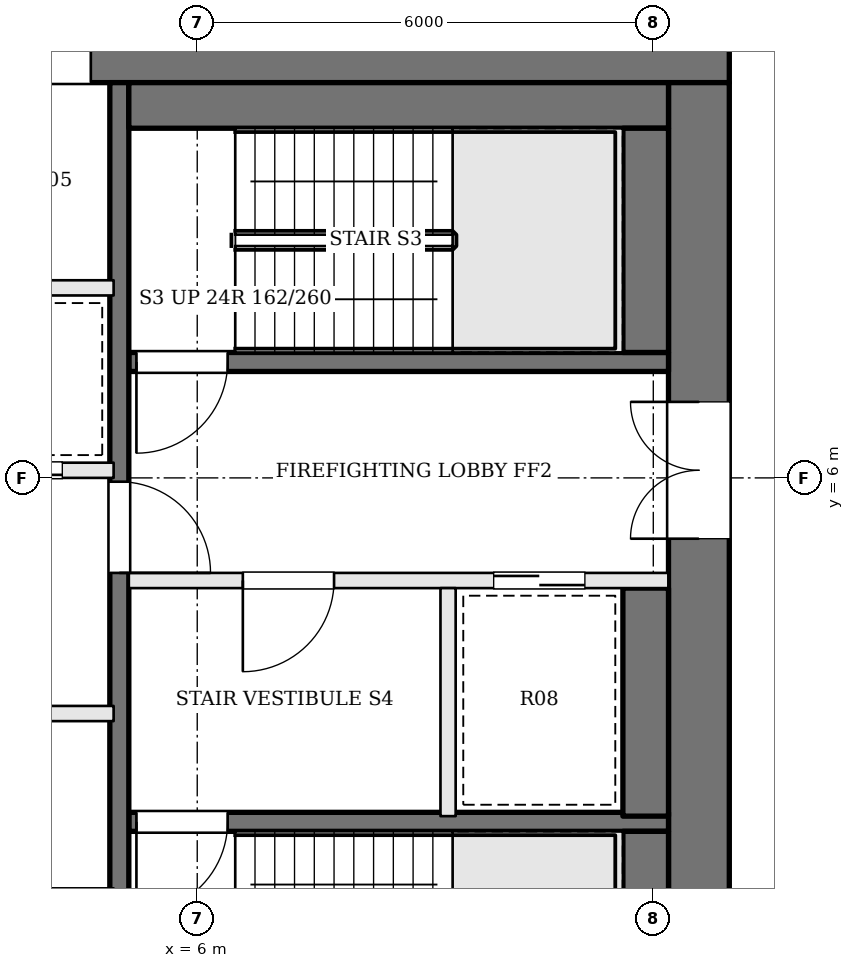
"""IFC4 building model, lengths in metres.
Left out: names, types, materials, properties, quantities, classifications, styles, units other than length and angle.
Written with IfcOpenShell. Run it as: python <this file> out.ifc"""

import sys

from ifc_helpers import new_model, si_unit, direction, frame, frame_2d, origin, place, context, subcontext, project, spatial, rectangle, extrude, element, fill, save


model = new_model("IFC4")
c1 = context("Model", 3, precision=1e-05, world=origin(), true_north=direction((0.0, 1.0)))
c2 = subcontext(c1, "Body", "Model", "MODEL_VIEW")
j1 = project(units=[si_unit("LENGTHUNIT", "METRE"), si_unit("PLANEANGLEUNIT", "RADIAN")], contexts=[c1])
p1 = place(None, origin())
s1 = spatial("IfcSite", under=j1, at=p1, CompositionType="ELEMENT")
p2 = place(p1, origin())
s2 = spatial("IfcBuilding", under=s1, at=p2, CompositionType="ELEMENT")
p3 = place(p2, frame((0.0, 0.0, 221.4)))
s3 = spatial("IfcBuildingStorey", under=s2, at=p3, CompositionType="ELEMENT", Elevation=221.4)
p4 = place(p3, frame((-13.0, 11.6, 0.0), z_axis=(0.0, 0.0, 1.0), x_axis=(1.0, 0.0, 0.0)))
e1 = element("IfcWall", 1, at=p4, inside=s3, PredefinedType="SHEAR", context=c2, shape_type="SweptSolid", body=[
    extrude(rectangle(XDim=26.0, YDim=0.8, at=frame_2d((13.0, 0.0))), origin(), (0.0, 0.0, 1.0), 3.9),
])
p5 = place(p4, frame((9.65, 0.0, 0.0)))
e2 = element("IfcOpeningElement", 2, at=p5, cuts=e1, PredefinedType="OPENING", context=c2, shape_type="SweptSolid", body=[
    extrude(rectangle(XDim=1.0, YDim=2.1, at=frame_2d((0.5, 1.05))), frame((0.0, 0.41, 0.0), z_axis=(0.0, -1.0, 0.0), x_axis=(1.0, 0.0, 0.0)), (0.0, 0.0, 1.0), 0.82),
])
p6 = place(p4, frame((12.675, 0.0, 0.0)))
e3 = element("IfcOpeningElement", 3, at=p6, cuts=e1, PredefinedType="OPENING", context=c2, shape_type="SweptSolid", body=[
    extrude(rectangle(XDim=0.7, YDim=2.1, at=frame_2d((0.35, 1.05))), frame((0.0, 0.41, 0.0), z_axis=(0.0, -1.0, 0.0), x_axis=(1.0, 0.0, 0.0)), (0.0, 0.0, 1.0), 0.82),
])
p7 = place(p4, frame((14.725, 0.0, 0.0)))
e4 = element("IfcOpeningElement", 4, at=p7, cuts=e1, PredefinedType="OPENING", context=c2, shape_type="SweptSolid", body=[
    extrude(rectangle(XDim=0.7, YDim=2.1, at=frame_2d((0.35, 1.05))), frame((0.0, 0.41, 0.0), z_axis=(0.0, -1.0, 0.0), x_axis=(1.0, 0.0, 0.0)), (0.0, 0.0, 1.0), 0.82),
])
p8 = place(p4, frame((16.6, 0.0, 0.0)))
e5 = element("IfcOpeningElement", 5, at=p8, cuts=e1, PredefinedType="OPENING", context=c2, shape_type="SweptSolid", body=[
    extrude(rectangle(XDim=1.0, YDim=2.1, at=frame_2d((0.5, 1.05))), frame((0.0, 0.41, 0.0), z_axis=(0.0, -1.0, 0.0), x_axis=(1.0, 0.0, 0.0)), (0.0, 0.0, 1.0), 0.82),
])
p9 = place(p3, frame((12.6, -2.2, 0.0), z_axis=(0.0, 0.0, 1.0), x_axis=(0.0, 1.0, 0.0)))
e6 = element("IfcWall", 6, at=p9, inside=s3, PredefinedType="SHEAR", context=c2, shape_type="SweptSolid", body=[
    extrude(rectangle(XDim=13.4, YDim=0.8, at=frame_2d((6.7, 0.0))), origin(), (0.0, 0.0, 1.0), 3.9),
])
p10 = place(p9, frame((7.4, 0.0, 0.0)))
e7 = element("IfcOpeningElement", 7, at=p10, cuts=e6, PredefinedType="OPENING", context=c2, shape_type="SweptSolid", body=[
    extrude(rectangle(XDim=1.8, YDim=2.1, at=frame_2d((0.9, 1.05))), frame((0.0, 0.41, 0.0), z_axis=(0.0, -1.0, 0.0), x_axis=(1.0, 0.0, 0.0)), (0.0, 0.0, 1.0), 0.82),
])
p11 = place(p3, frame((12.2, 7.525, 0.0), z_axis=(0.0, 0.0, 1.0), x_axis=(-1.0, 0.0, 0.0)))
e8 = element("IfcWall", 8, at=p11, inside=s3, PredefinedType="SOLIDWALL", context=c2, shape_type="SweptSolid", body=[
    extrude(rectangle(XDim=7.1, YDim=0.25, at=frame_2d((3.55, 0.0))), origin(), (0.0, 0.0, 1.0), 3.7),
])
p12 = place(p11, frame((5.8, 0.0, 0.0)))
e9 = element("IfcOpeningElement", 9, at=p12, cuts=e8, PredefinedType="OPENING", context=c2, shape_type="SweptSolid", body=[
    extrude(rectangle(XDim=1.2, YDim=2.1, at=frame_2d((0.6, 1.05))), frame((0.0, 0.135, 0.0), z_axis=(0.0, -1.0, 0.0), x_axis=(1.0, 0.0, 0.0)), (0.0, 0.0, 1.0), 0.27),
])
p13 = place(p3, frame((12.2, 4.65, 0.0), z_axis=(0.0, 0.0, 1.0), x_axis=(-1.0, 0.0, 0.0)))
e10 = element("IfcWall", 10, at=p13, inside=s3, PredefinedType="SOLIDWALL", context=c2, shape_type="SweptSolid", body=[
    extrude(rectangle(XDim=7.1, YDim=0.2, at=frame_2d((3.55, 0.0))), origin(), (0.0, 0.0, 1.0), 3.7),
])
p14 = place(p13, frame((4.4, 0.0, 0.0)))
e11 = element("IfcOpeningElement", 11, at=p14, cuts=e10, PredefinedType="OPENING", context=c2, shape_type="SweptSolid", body=[
    extrude(rectangle(XDim=1.2, YDim=2.1, at=frame_2d((0.6, 1.05))), frame((0.0, 0.11, 0.0), z_axis=(0.0, -1.0, 0.0), x_axis=(1.0, 0.0, 0.0)), (0.0, 0.0, 1.0), 0.22),
])
p15 = place(p13, frame((1.1, 0.0, 0.0)))
e12 = element("IfcOpeningElement", 12, at=p15, cuts=e10, PredefinedType="OPENING", context=c2, shape_type="SweptSolid", body=[
    extrude(rectangle(XDim=1.2, YDim=2.1, at=frame_2d((0.6, 1.05))), frame((0.0, 0.11, 0.0), z_axis=(0.0, -1.0, 0.0), x_axis=(1.0, 0.0, 0.0)), (0.0, 0.0, 1.0), 0.22),
])
p16 = place(p3, frame((12.2, 1.475, 0.0), z_axis=(0.0, 0.0, 1.0), x_axis=(-1.0, 0.0, 0.0)))
e13 = element("IfcWall", 13, at=p16, inside=s3, PredefinedType="SOLIDWALL", context=c2, shape_type="SweptSolid", body=[
    extrude(rectangle(XDim=7.1, YDim=0.25, at=frame_2d((3.55, 0.0))), origin(), (0.0, 0.0, 1.0), 3.7),
])
p17 = place(p16, frame((5.8, 0.0, 0.0)))
e14 = element("IfcOpeningElement", 14, at=p17, cuts=e13, PredefinedType="OPENING", context=c2, shape_type="SweptSolid", body=[
    extrude(rectangle(XDim=1.2, YDim=2.1, at=frame_2d((0.6, 1.05))), frame((0.0, 0.135, 0.0), z_axis=(0.0, -1.0, 0.0), x_axis=(1.0, 0.0, 0.0)), (0.0, 0.0, 1.0), 0.27),
])
p18 = place(p3, frame((9.3, 4.55, 0.0), z_axis=(0.0, 0.0, 1.0), x_axis=(0.0, -1.0, 0.0)))
e15 = element("IfcWall", 15, at=p18, inside=s3, PredefinedType="SOLIDWALL", context=c2, shape_type="SweptSolid", body=[
    extrude(rectangle(XDim=3.0, YDim=0.2, at=frame_2d((1.5, 0.0))), origin(), (0.0, 0.0, 1.0), 3.7),
])
p19 = place(p3, frame((4.975, 11.2, 0.0), z_axis=(0.0, 0.0, 1.0), x_axis=(0.0, -1.0, 0.0)))
e16 = element("IfcWall", 16, at=p19, inside=s3, PredefinedType="SOLIDWALL", context=c2, shape_type="SweptSolid", body=[
    extrude(rectangle(XDim=13.4, YDim=0.25, at=frame_2d((6.7, 0.0))), origin(), (0.0, 0.0, 1.0), 3.7),
])
p20 = place(p19, frame((5.25, 0.0, 0.0)))
e17 = element("IfcOpeningElement", 17, at=p20, cuts=e16, PredefinedType="OPENING", context=c2, shape_type="SweptSolid", body=[
    extrude(rectangle(XDim=1.2, YDim=2.1, at=frame_2d((0.6, 1.05))), frame((0.0, 0.135, 0.0), z_axis=(0.0, -1.0, 0.0), x_axis=(1.0, 0.0, 0.0)), (0.0, 0.0, 1.0), 0.27),
])
p21 = place(p3, frame((12.2, 10.9, 0.0), z_axis=(0.0, 0.0, 1.0), x_axis=(-1.0, 0.0, 0.0)))
e18 = element("IfcWall", 18, at=p21, inside=s3, PredefinedType="SOLIDWALL", context=c2, shape_type="SweptSolid", body=[
    extrude(rectangle(XDim=7.1, YDim=0.6, at=frame_2d((3.55, 0.0))), origin(), (0.0, 0.0, 1.0), 3.7),
])
p22 = place(p3, frame((11.9, 10.6, 0.0), z_axis=(0.0, 0.0, 1.0), x_axis=(0.0, -1.0, 0.0)))
e19 = element("IfcWall", 19, at=p22, inside=s3, PredefinedType="SOLIDWALL", context=c2, shape_type="SweptSolid", body=[
    extrude(rectangle(XDim=2.95, YDim=0.6, at=frame_2d((1.475, 0.0))), origin(), (0.0, 0.0, 1.0), 3.7),
])
p23 = place(p3, frame((11.9, 4.55, 0.0), z_axis=(0.0, 0.0, 1.0), x_axis=(0.0, -1.0, 0.0)))
e20 = element("IfcWall", 20, at=p23, inside=s3, PredefinedType="SOLIDWALL", context=c2, shape_type="SweptSolid", body=[
    extrude(rectangle(XDim=3.0, YDim=0.6, at=frame_2d((1.5, 0.0))), origin(), (0.0, 0.0, 1.0), 3.7),
])
p24 = place(p3, frame((11.9, 1.35, 0.0), z_axis=(0.0, 0.0, 1.0), x_axis=(0.0, -1.0, 0.0)))
e21 = element("IfcWall", 21, at=p24, inside=s3, PredefinedType="SOLIDWALL", context=c2, shape_type="SweptSolid", body=[
    extrude(rectangle(XDim=2.95, YDim=0.6, at=frame_2d((1.475, 0.0))), origin(), (0.0, 0.0, 1.0), 3.7),
])
p25 = place(p3, frame((-4.9, 2.9, 0.0), z_axis=(0.0, 0.0, 1.0), x_axis=(1.0, 0.0, 0.0)))
e22 = element("IfcWall", 22, at=p25, inside=s3, PredefinedType="SOLIDWALL", context=c2, shape_type="SweptSolid", body=[
    extrude(rectangle(XDim=9.8, YDim=0.2, at=frame_2d((4.9, 0.0))), origin(), (0.0, 0.0, 1.0), 3.7),
])
p26 = place(p25, frame((0.675, 0.0, 0.0)))
e23 = element("IfcOpeningElement", 23, at=p26, cuts=e22, PredefinedType="OPENING", context=c2, shape_type="SweptSolid", body=[
    extrude(rectangle(XDim=1.1, YDim=2.1, at=frame_2d((0.55, 1.05))), frame((0.0, 0.11, 0.0), z_axis=(0.0, -1.0, 0.0), x_axis=(1.0, 0.0, 0.0)), (0.0, 0.0, 1.0), 0.22),
])
p27 = place(p25, frame((2.613, 0.0, 0.0)))
e24 = element("IfcOpeningElement", 24, at=p27, cuts=e22, PredefinedType="OPENING", context=c2, shape_type="SweptSolid", body=[
    extrude(rectangle(XDim=0.9, YDim=2.1, at=frame_2d((0.45, 1.05))), frame((0.0, 0.11, 0.0), z_axis=(0.0, -1.0, 0.0), x_axis=(1.0, 0.0, 0.0)), (0.0, 0.0, 1.0), 0.22),
])
p28 = place(p25, frame((4.35, 0.0, 0.0)))
e25 = element("IfcOpeningElement", 25, at=p28, cuts=e22, PredefinedType="OPENING", context=c2, shape_type="SweptSolid", body=[
    extrude(rectangle(XDim=1.1, YDim=2.1, at=frame_2d((0.55, 1.05))), frame((0.0, 0.11, 0.0), z_axis=(0.0, -1.0, 0.0), x_axis=(1.0, 0.0, 0.0)), (0.0, 0.0, 1.0), 0.22),
])
p29 = place(p25, frame((7.463, 0.0, 0.0)))
e26 = element("IfcOpeningElement", 26, at=p29, cuts=e22, PredefinedType="OPENING", context=c2, shape_type="SweptSolid", body=[
    extrude(rectangle(XDim=1.0, YDim=2.1, at=frame_2d((0.5, 1.05))), frame((0.0, 0.11, 0.0), z_axis=(0.0, -1.0, 0.0), x_axis=(1.0, 0.0, 0.0)), (0.0, 0.0, 1.0), 0.22),
])
p30 = place(p3, frame((-4.9, 6.1, 0.0), z_axis=(0.0, 0.0, 1.0), x_axis=(1.0, 0.0, 0.0)))
e27 = element("IfcWall", 27, at=p30, inside=s3, PredefinedType="SOLIDWALL", context=c2, shape_type="SweptSolid", body=[
    extrude(rectangle(XDim=9.8, YDim=0.2, at=frame_2d((4.9, 0.0))), origin(), (0.0, 0.0, 1.0), 3.7),
])
p31 = place(p30, frame((0.675, 0.0, 0.0)))
e28 = element("IfcOpeningElement", 28, at=p31, cuts=e27, PredefinedType="OPENING", context=c2, shape_type="SweptSolid", body=[
    extrude(rectangle(XDim=1.1, YDim=2.1, at=frame_2d((0.55, 1.05))), frame((0.0, 0.11, 0.0), z_axis=(0.0, -1.0, 0.0), x_axis=(1.0, 0.0, 0.0)), (0.0, 0.0, 1.0), 0.22),
])
p32 = place(p30, frame((3.125, 0.0, 0.0)))
e29 = element("IfcOpeningElement", 29, at=p32, cuts=e27, PredefinedType="OPENING", context=c2, shape_type="SweptSolid", body=[
    extrude(rectangle(XDim=1.1, YDim=2.1, at=frame_2d((0.55, 1.05))), frame((0.0, 0.11, 0.0), z_axis=(0.0, -1.0, 0.0), x_axis=(1.0, 0.0, 0.0)), (0.0, 0.0, 1.0), 0.22),
])
p33 = place(p30, frame((5.575, 0.0, 0.0)))
e30 = element("IfcOpeningElement", 30, at=p33, cuts=e27, PredefinedType="OPENING", context=c2, shape_type="SweptSolid", body=[
    extrude(rectangle(XDim=1.1, YDim=2.1, at=frame_2d((0.55, 1.05))), frame((0.0, 0.11, 0.0), z_axis=(0.0, -1.0, 0.0), x_axis=(1.0, 0.0, 0.0)), (0.0, 0.0, 1.0), 0.22),
])
p34 = place(p30, frame((8.025, 0.0, 0.0)))
e31 = element("IfcOpeningElement", 31, at=p34, cuts=e27, PredefinedType="OPENING", context=c2, shape_type="SweptSolid", body=[
    extrude(rectangle(XDim=1.1, YDim=2.1, at=frame_2d((0.55, 1.05))), frame((0.0, 0.11, 0.0), z_axis=(0.0, -1.0, 0.0), x_axis=(1.0, 0.0, 0.0)), (0.0, 0.0, 1.0), 0.22),
])
p35 = place(p3, frame((-4.9, 8.5, 0.0), z_axis=(0.0, 0.0, 1.0), x_axis=(1.0, 0.0, 0.0)))
e32 = element("IfcWall", 32, at=p35, inside=s3, PredefinedType="SOLIDWALL", context=c2, shape_type="SweptSolid", body=[
    extrude(rectangle(XDim=9.8, YDim=0.2, at=frame_2d((4.9, 0.0))), origin(), (0.0, 0.0, 1.0), 3.7),
])
p36 = place(p10, origin())
e33 = element("IfcDoor", 33, at=p36, inside=s3, OperationType="DOUBLE_DOOR_SINGLE_SWING", PredefinedType="DOOR", context=c2, shape_type="SweptSolid", body=[
    extrude(rectangle(XDim=1.8, YDim=2.1, at=frame_2d((0.9, 1.05))), frame((0.0, 0.025, 0.0), z_axis=(0.0, -1.0, 0.0), x_axis=(1.0, 0.0, 0.0)), (0.0, 0.0, 1.0), 0.05),
])
fill(e7, e33)
p37 = place(p20, origin())
e34 = element("IfcDoor", 34, at=p37, inside=s3, OperationType="SINGLE_SWING_RIGHT", PredefinedType="DOOR", context=c2, shape_type="SweptSolid", body=[
    extrude(rectangle(XDim=1.2, YDim=2.1, at=frame_2d((0.6, 1.05))), frame((0.0, 0.025, 0.0), z_axis=(0.0, -1.0, 0.0), x_axis=(1.0, 0.0, 0.0)), (0.0, 0.0, 1.0), 0.05),
])
fill(e17, e34)
p38 = place(p14, origin())
e35 = element("IfcDoor", 35, at=p38, inside=s3, OperationType="SINGLE_SWING_RIGHT", PredefinedType="DOOR", context=c2, shape_type="SweptSolid", body=[
    extrude(rectangle(XDim=1.2, YDim=2.1, at=frame_2d((0.6, 1.05))), frame((0.0, 0.025, 0.0), z_axis=(0.0, -1.0, 0.0), x_axis=(1.0, 0.0, 0.0)), (0.0, 0.0, 1.0), 0.05),
])
fill(e11, e35)
p39 = place(p12, origin())
e36 = element("IfcDoor", 36, at=p39, inside=s3, OperationType="SINGLE_SWING_RIGHT", PredefinedType="DOOR", context=c2, shape_type="SweptSolid", body=[
    extrude(rectangle(XDim=1.2, YDim=2.1, at=frame_2d((0.6, 1.05))), frame((0.0, 0.025, 0.0), z_axis=(0.0, -1.0, 0.0), x_axis=(1.0, 0.0, 0.0)), (0.0, 0.0, 1.0), 0.05),
])
fill(e9, e36)
p40 = place(p17, origin())
e37 = element("IfcDoor", 37, at=p40, inside=s3, OperationType="SINGLE_SWING_RIGHT", PredefinedType="DOOR", context=c2, shape_type="SweptSolid", body=[
    extrude(rectangle(XDim=1.2, YDim=2.1, at=frame_2d((0.6, 1.05))), frame((0.0, 0.025, 0.0), z_axis=(0.0, -1.0, 0.0), x_axis=(1.0, 0.0, 0.0)), (0.0, 0.0, 1.0), 0.05),
])
fill(e14, e37)
p41 = place(p15, origin())
e38 = element("IfcDoor", 38, at=p41, inside=s3, OperationType="SLIDING_TO_RIGHT", PredefinedType="DOOR", context=c2, shape_type="SweptSolid", body=[
    extrude(rectangle(XDim=1.2, YDim=2.1, at=frame_2d((0.6, 1.05))), frame((0.0, 0.025, 0.0), z_axis=(0.0, -1.0, 0.0), x_axis=(1.0, 0.0, 0.0)), (0.0, 0.0, 1.0), 0.05),
])
fill(e12, e38)
p42 = place(p34, origin())
e39 = element("IfcDoor", 39, at=p42, inside=s3, OperationType="SLIDING_TO_LEFT", PredefinedType="DOOR", context=c2, shape_type="SweptSolid", body=[
    extrude(rectangle(XDim=1.1, YDim=2.1, at=frame_2d((0.55, 1.05))), frame((0.0, 0.025, 0.0), z_axis=(0.0, -1.0, 0.0), x_axis=(1.0, 0.0, 0.0)), (0.0, 0.0, 1.0), 0.05),
])
fill(e31, e39)
p43 = place(p8, origin())
e40 = element("IfcDoor", 40, at=p43, inside=s3, OperationType="SINGLE_SWING_RIGHT", PredefinedType="DOOR", context=c2, shape_type="SweptSolid", body=[
    extrude(rectangle(XDim=1.0, YDim=2.1, at=frame_2d((0.5, 1.05))), frame((0.0, 0.025, 0.0), z_axis=(0.0, -1.0, 0.0), x_axis=(1.0, 0.0, 0.0)), (0.0, 0.0, 1.0), 0.05),
])
fill(e5, e40)
save(model, sys.argv[1])
